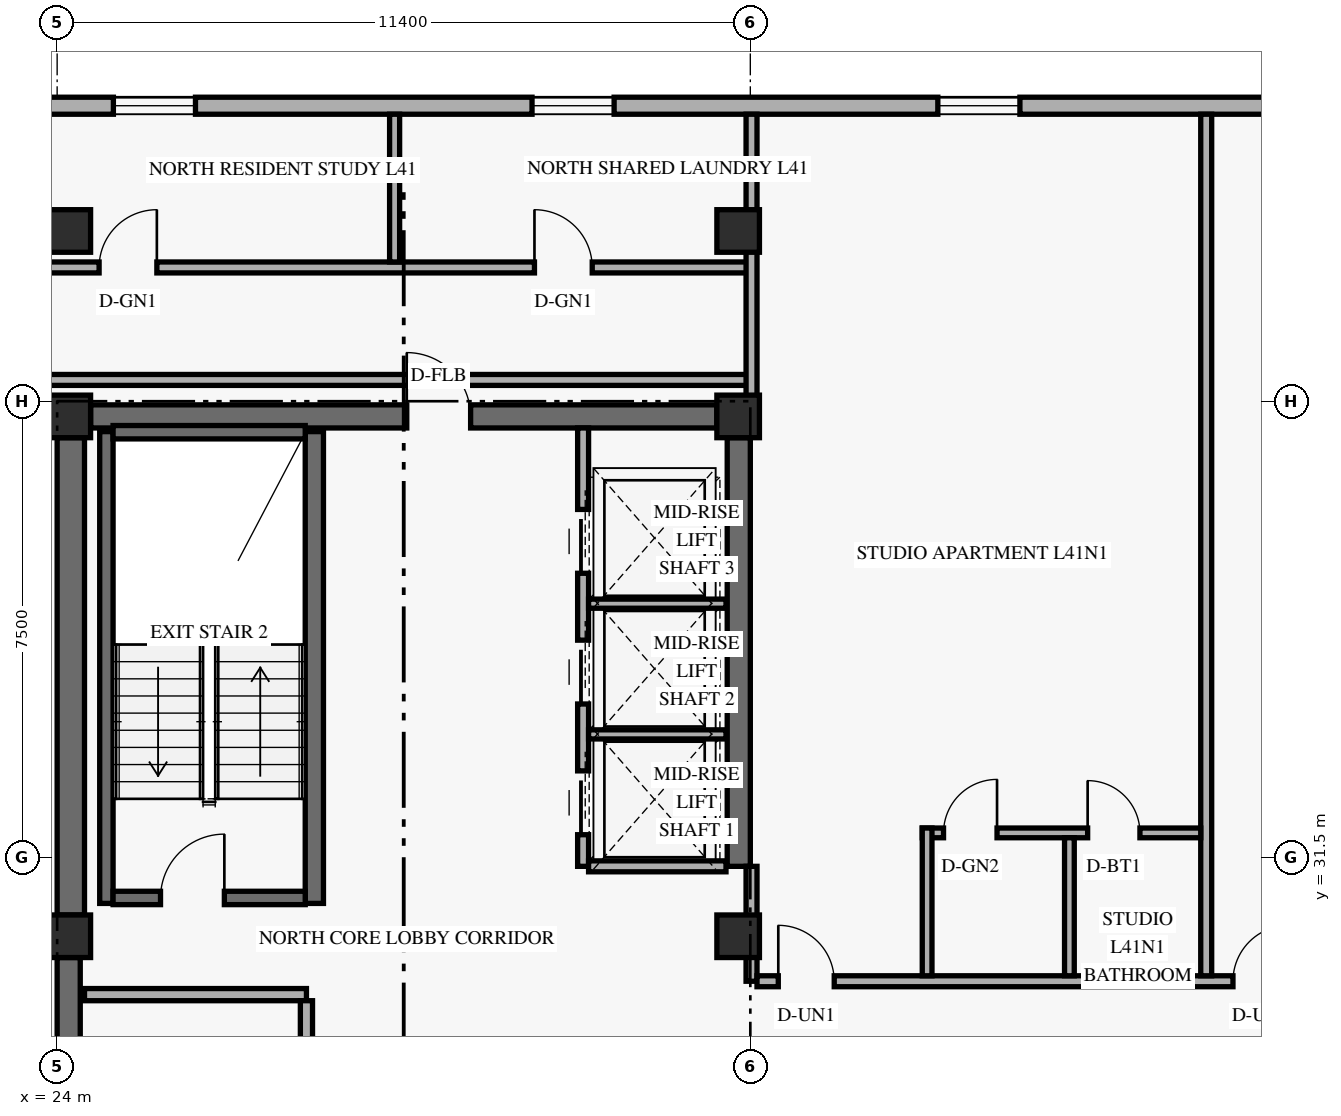
"""IFC4 building model, lengths in metres.
Left out: names, types, materials, properties, quantities, classifications, styles, units other than length and angle.
Written with IfcOpenShell. Run it as: python <this file> out.ifc"""

import sys

from ifc_helpers import new_model, si_unit, direction, frame, frame_2d, origin, origin_2d, place, context, subcontext, project, spatial, rectangle, extrude, element, fill, save


model = new_model("IFC4")
c1 = context("Model", 3, precision=1e-05, world=origin(), true_north=direction((0.0, 1.0)))
c2 = subcontext(c1, "Body", "Model", "MODEL_VIEW")
j1 = project(units=[si_unit("LENGTHUNIT", "METRE"), si_unit("PLANEANGLEUNIT", "RADIAN")], contexts=[c1])
p1 = place(None, origin())
s1 = spatial("IfcSite", under=j1, at=p1, CompositionType="ELEMENT")
p2 = place(p1, origin())
s2 = spatial("IfcBuilding", under=s1, at=p2, CompositionType="ELEMENT")
p3 = place(p2, frame((0.0, 0.0, 159.0)))
s3 = spatial("IfcBuildingStorey", under=s2, at=p3, CompositionType="ELEMENT", Elevation=159.0)
p4 = place(p3, frame((24.19, 17.9, 0.0), z_axis=(0.0, 0.0, 1.0), x_axis=(0.0, 1.0, 0.0)))
e1 = element("IfcWall", 1, at=p4, inside=s3, PredefinedType="SHEAR", context=c2, shape_type="SweptSolid", body=[
    extrude(rectangle(XDim=11.95, YDim=0.38, at=frame_2d((5.975, 0.0))), origin(), (0.0, 0.0, 1.0), 2.748),
])
p5 = place(p3, frame((24.225, 30.55, 0.0), z_axis=(0.0, 0.0, 1.0), x_axis=(0.0, 1.0, 0.0)))
e2 = element("IfcWall", 2, at=p5, inside=s3, PredefinedType="SHEAR", context=c2, shape_type="SweptSolid", body=[
    extrude(rectangle(XDim=7.85, YDim=0.45, at=frame_2d((3.925, 0.0))), origin(), (0.0, 0.0, 1.0), 2.748),
])
p6 = place(p3, frame((35.21, 31.35, 0.0), z_axis=(0.0, 0.0, 1.0), x_axis=(0.0, 1.0, 0.0)))
e3 = element("IfcWall", 3, at=p6, inside=s3, PredefinedType="SHEAR", context=c2, shape_type="SweptSolid", body=[
    extrude(rectangle(XDim=7.05, YDim=0.38, at=frame_2d((3.525, 0.0))), origin(), (0.0, 0.0, 1.0), 2.748),
])
p7 = place(p3, frame((24.55, 38.75, 0.0), z_axis=(0.0, 0.0, 1.0), x_axis=(1.0, 0.0, 0.0)))
e4 = element("IfcWall", 4, at=p7, inside=s3, PredefinedType="SHEAR", context=c2, shape_type="SweptSolid", body=[
    extrude(rectangle(XDim=10.3, YDim=0.38, at=frame_2d((5.15, 0.0))), origin(), (0.0, 0.0, 1.0), 3.36),
])
p8 = place(p7, frame((5.2, 0.0, 0.0)))
e5 = element("IfcOpeningElement", 5, at=p8, cuts=e4, PredefinedType="OPENING", context=c2, shape_type="SweptSolid", body=[
    extrude(rectangle(XDim=1.05, YDim=2.15, at=frame_2d((0.525, 1.075))), frame((0.0, 0.2, 0.0), z_axis=(0.0, -1.0, 0.0), x_axis=(1.0, 0.0, 0.0)), (0.0, 0.0, 1.0), 0.4),
])
p9 = place(p3, frame((24.81, 30.74, 0.0), z_axis=(0.0, 0.0, 1.0), x_axis=(0.0, 1.0, 0.0)))
e6 = element("IfcWall", 6, at=p9, inside=s3, PredefinedType="SHEAR", context=c2, shape_type="SweptSolid", body=[
    extrude(rectangle(XDim=7.76, YDim=0.22, at=frame_2d((3.88, 0.0))), origin(), (0.0, 0.0, 1.0), 3.36),
])
p10 = place(p3, frame((28.23, 30.74, 0.0), z_axis=(0.0, 0.0, 1.0), x_axis=(0.0, 1.0, 0.0)))
e7 = element("IfcWall", 7, at=p10, inside=s3, PredefinedType="SHEAR", context=c2, shape_type="SweptSolid", body=[
    extrude(rectangle(XDim=7.76, YDim=0.3, at=frame_2d((3.88, 0.0))), origin(), (0.0, 0.0, 1.0), 3.36),
])
p11 = place(p3, frame((24.92, 30.83, 0.0), z_axis=(0.0, 0.0, 1.0), x_axis=(1.0, 0.0, 0.0)))
e8 = element("IfcWall", 8, at=p11, inside=s3, PredefinedType="SHEAR", context=c2, shape_type="SweptSolid", body=[
    extrude(rectangle(XDim=3.16, YDim=0.22, at=frame_2d((1.58, 0.0))), origin(), (0.0, 0.0, 1.0), 3.36),
])
p12 = place(p11, frame((0.78, 0.0, 0.0)))
e9 = element("IfcOpeningElement", 9, at=p12, cuts=e8, PredefinedType="OPENING", context=c2, shape_type="SweptSolid", body=[
    extrude(rectangle(XDim=1.05, YDim=2.15, at=frame_2d((0.525, 1.075))), frame((0.0, 0.12, 0.0), z_axis=(0.0, -1.0, 0.0), x_axis=(1.0, 0.0, 0.0)), (0.0, 0.0, 1.0), 0.24),
])
p13 = place(p3, frame((24.92, 38.49, 0.0), z_axis=(0.0, 0.0, 1.0), x_axis=(1.0, 0.0, 0.0)))
e10 = element("IfcWall", 10, at=p13, inside=s3, PredefinedType="SHEAR", context=c2, shape_type="SweptSolid", body=[
    extrude(rectangle(XDim=3.16, YDim=0.22, at=frame_2d((1.58, 0.0))), origin(), (0.0, 0.0, 1.0), 3.36),
])
for number, where, z_axis, x_axis in (
    (11, (24.2, 30.2, 0.0), (0.0, 0.0, 1.0), (1.0, 0.0, 0.0)),
    (12, (24.2, 38.75, 0.0), (0.0, 0.0, 1.0), (1.0, 0.0, 0.0)),
    (13, (24.2, 41.8, 0.0), (0.0, 0.0, 1.0), (1.0, 0.0, 0.0)),
    (14, (35.2, 30.2, 0.0), (0.0, 0.0, 1.0), (1.0, 0.0, 0.0)),
    (15, (35.2, 38.75, 0.0), (0.0, 0.0, 1.0), (1.0, 0.0, 0.0)),
    (16, (35.2, 41.8, 0.0), (0.0, 0.0, 1.0), (1.0, 0.0, 0.0)),
):
    element("IfcColumn", number, at=place(p3, frame(where, z_axis=z_axis, x_axis=x_axis)), inside=s3, PredefinedType="COLUMN", context=c2, shape_type="SweptSolid", body=[
        extrude(rectangle(XDim=0.7, YDim=0.7, at=origin_2d()), origin(), (0.0, 0.0, 1.0), 3.6),
    ])
p14 = place(p3, frame((54.98, 43.86, 0.0), z_axis=(0.0, 0.0, 1.0), x_axis=(-1.0, 0.0, 0.0)))
e17 = element("IfcWall", 17, at=p14, inside=s3, PredefinedType="SOLIDWALL", context=c2, shape_type="SweptSolid", body=[
    extrude(rectangle(XDim=33.76, YDim=0.28, at=frame_2d((16.88, 0.0))), origin(), (0.0, 0.0, 1.0), 3.36),
])
p15 = place(p14, frame((28.705, 0.0, 0.85)))
e18 = element("IfcOpeningElement", 18, at=p15, cuts=e17, PredefinedType="OPENING", context=c2, shape_type="SweptSolid", body=[
    extrude(rectangle(XDim=1.35, YDim=1.55, at=frame_2d((0.675, 0.775))), frame((0.0, 0.15, 0.0), z_axis=(0.0, -1.0, 0.0), x_axis=(1.0, 0.0, 0.0)), (0.0, 0.0, 1.0), 0.3),
])
p16 = place(p14, frame((21.82, 0.0, 0.85)))
e19 = element("IfcOpeningElement", 19, at=p16, cuts=e17, PredefinedType="OPENING", context=c2, shape_type="SweptSolid", body=[
    extrude(rectangle(XDim=1.35, YDim=1.55, at=frame_2d((0.675, 0.775))), frame((0.0, 0.15, 0.0), z_axis=(0.0, -1.0, 0.0), x_axis=(1.0, 0.0, 0.0)), (0.0, 0.0, 1.0), 0.3),
])
p17 = place(p14, frame((15.146, 0.0, 0.85)))
e20 = element("IfcOpeningElement", 20, at=p17, cuts=e17, PredefinedType="OPENING", context=c2, shape_type="SweptSolid", body=[
    extrude(rectangle(XDim=1.35, YDim=1.55, at=frame_2d((0.675, 0.775))), frame((0.0, 0.15, 0.0), z_axis=(0.0, -1.0, 0.0), x_axis=(1.0, 0.0, 0.0)), (0.0, 0.0, 1.0), 0.3),
])
p18 = place(p14, frame((7.956, 0.0, 0.85)))
e21 = element("IfcOpeningElement", 21, at=p18, cuts=e17, PredefinedType="OPENING", context=c2, shape_type="SweptSolid", body=[
    extrude(rectangle(XDim=1.35, YDim=1.55, at=frame_2d((0.675, 0.775))), frame((0.0, 0.15, 0.0), z_axis=(0.0, -1.0, 0.0), x_axis=(1.0, 0.0, 0.0)), (0.0, 0.0, 1.0), 0.3),
])
p19 = place(p14, frame((1.915, 0.0, 0.85)))
e22 = element("IfcOpeningElement", 22, at=p19, cuts=e17, PredefinedType="OPENING", context=c2, shape_type="SweptSolid", body=[
    extrude(rectangle(XDim=1.35, YDim=1.55, at=frame_2d((0.675, 0.775))), frame((0.0, 0.15, 0.0), z_axis=(0.0, -1.0, 0.0), x_axis=(1.0, 0.0, 0.0)), (0.0, 0.0, 1.0), 0.3),
])
p20 = place(p3, frame((24.45, 29.24, 0.0), z_axis=(0.0, 0.0, 1.0), x_axis=(1.0, 0.0, 0.0)))
e23 = element("IfcWall", 23, at=p20, inside=s3, PredefinedType="STANDARD", context=c2, shape_type="SweptSolid", body=[
    extrude(rectangle(XDim=3.65, YDim=0.2, at=frame_2d((1.825, 0.0))), origin(), (0.0, 0.0, 1.0), 3.36),
])
p21 = place(p3, frame((28.1, 24.39, 0.0), z_axis=(0.0, 0.0, 1.0), x_axis=(0.0, 1.0, 0.0)))
e24 = element("IfcWall", 24, at=p21, inside=s3, PredefinedType="STANDARD", context=c2, shape_type="SweptSolid", body=[
    extrude(rectangle(XDim=4.75, YDim=0.2, at=frame_2d((2.375, 0.0))), origin(), (0.0, 0.0, 1.0), 3.36),
])
p22 = place(p21, frame((0.63, 0.0, 0.0)))
e25 = element("IfcOpeningElement", 25, at=p22, cuts=e24, PredefinedType="OPENING", context=c2, shape_type="SweptSolid", body=[
    extrude(rectangle(XDim=0.9, YDim=2.1, at=frame_2d((0.45, 1.05))), frame((0.0, 0.11, 0.0), z_axis=(0.0, -1.0, 0.0), x_axis=(1.0, 0.0, 0.0)), (0.0, 0.0, 1.0), 0.22),
])
p23 = place(p21, frame((3.06, 0.0, 0.0)))
e26 = element("IfcOpeningElement", 26, at=p23, cuts=e24, PredefinedType="OPENING", context=c2, shape_type="SweptSolid", body=[
    extrude(rectangle(XDim=0.9, YDim=2.1, at=frame_2d((0.45, 1.05))), frame((0.0, 0.11, 0.0), z_axis=(0.0, -1.0, 0.0), x_axis=(1.0, 0.0, 0.0)), (0.0, 0.0, 1.0), 0.22),
])
p24 = place(p3, frame((32.65, 31.35, 0.0), z_axis=(0.0, 0.0, 1.0), x_axis=(0.0, 1.0, 0.0)))
e27 = element("IfcWall", 27, at=p24, inside=s3, PredefinedType="STANDARD", context=c2, shape_type="SweptSolid", body=[
    extrude(rectangle(XDim=7.21, YDim=0.18, at=frame_2d((3.605, 0.0))), origin(), (0.0, 0.0, 1.0), 3.36),
])
p25 = place(p24, frame((0.52, 0.0, 0.0)))
e28 = element("IfcOpeningElement", 28, at=p25, cuts=e27, PredefinedType="OPENING", context=c2, shape_type="SweptSolid", body=[
    extrude(rectangle(XDim=1.05, YDim=2.2, at=frame_2d((0.525, 1.1))), frame((0.0, 0.1, 0.0), z_axis=(0.0, -1.0, 0.0), x_axis=(1.0, 0.0, 0.0)), (0.0, 0.0, 1.0), 0.2),
])
p26 = place(p24, frame((2.67, 0.0, 0.0)))
e29 = element("IfcOpeningElement", 29, at=p26, cuts=e27, PredefinedType="OPENING", context=c2, shape_type="SweptSolid", body=[
    extrude(rectangle(XDim=1.05, YDim=2.2, at=frame_2d((0.525, 1.1))), frame((0.0, 0.1, 0.0), z_axis=(0.0, -1.0, 0.0), x_axis=(1.0, 0.0, 0.0)), (0.0, 0.0, 1.0), 0.2),
])
p27 = place(p24, frame((4.82, 0.0, 0.0)))
e30 = element("IfcOpeningElement", 30, at=p27, cuts=e27, PredefinedType="OPENING", context=c2, shape_type="SweptSolid", body=[
    extrude(rectangle(XDim=1.05, YDim=2.2, at=frame_2d((0.525, 1.1))), frame((0.0, 0.1, 0.0), z_axis=(0.0, -1.0, 0.0), x_axis=(1.0, 0.0, 0.0)), (0.0, 0.0, 1.0), 0.2),
])
p28 = place(p3, frame((32.74, 31.35, 0.0), z_axis=(0.0, 0.0, 1.0), x_axis=(1.0, 0.0, 0.0)))
e31 = element("IfcWall", 31, at=p28, inside=s3, PredefinedType="STANDARD", context=c2, shape_type="SweptSolid", body=[
    extrude(rectangle(XDim=2.26, YDim=0.18, at=frame_2d((1.13, 0.0))), origin(), (0.0, 0.0, 1.0), 3.36),
])
for number, where, z_axis, x_axis in (
    (32, (32.74, 33.52, 0.0), (0.0, 0.0, 1.0), (1.0, 0.0, 0.0)),
    (33, (32.74, 35.67, 0.0), (0.0, 0.0, 1.0), (1.0, 0.0, 0.0)),
):
    element("IfcWall", number, at=place(p3, frame(where, z_axis=z_axis, x_axis=x_axis)), inside=s3, PredefinedType="STANDARD", context=c2, shape_type="SweptSolid", body=[
        extrude(rectangle(XDim=2.26, YDim=0.15, at=frame_2d((1.13, 0.0))), origin(), (0.0, 0.0, 1.0), 3.36),
    ])
p29 = place(p3, frame((35.42, 29.46, 0.0), z_axis=(0.0, 0.0, 1.0), x_axis=(0.0, 1.0, 0.0)))
e34 = element("IfcWall", 34, at=p29, inside=s3, PredefinedType="STANDARD", context=c2, shape_type="SweptSolid", body=[
    extrude(rectangle(XDim=1.89, YDim=0.18, at=frame_2d((0.945, 0.0))), origin(), (0.0, 0.0, 1.0), 2.73),
])
p30 = place(p3, frame((35.51, 29.46, 0.0), z_axis=(0.0, 0.0, 1.0), x_axis=(1.0, 0.0, 0.0)))
e35 = element("IfcWall", 35, at=p30, inside=s3, PredefinedType="STANDARD", context=c2, shape_type="SweptSolid", body=[
    extrude(rectangle(XDim=14.29, YDim=0.18, at=frame_2d((7.145, 0.0))), origin(), (0.0, 0.0, 1.0), 2.73),
])
p31 = place(p30, frame((0.35, 0.0, 0.0)))
e36 = element("IfcOpeningElement", 36, at=p31, cuts=e35, PredefinedType="OPENING", context=c2, shape_type="SweptSolid", body=[
    extrude(rectangle(XDim=0.92, YDim=2.15, at=frame_2d((0.46, 1.075))), frame((0.0, 0.1, 0.0), z_axis=(0.0, -1.0, 0.0), x_axis=(1.0, 0.0, 0.0)), (0.0, 0.0, 1.0), 0.2),
])
p32 = place(p30, frame((7.828, 0.0, 0.0)))
e37 = element("IfcOpeningElement", 37, at=p32, cuts=e35, PredefinedType="OPENING", context=c2, shape_type="SweptSolid", body=[
    extrude(rectangle(XDim=0.92, YDim=2.15, at=frame_2d((0.46, 1.075))), frame((0.0, 0.1, 0.0), z_axis=(0.0, -1.0, 0.0), x_axis=(1.0, 0.0, 0.0)), (0.0, 0.0, 1.0), 0.2),
])
p33 = place(p3, frame((21.74, 41.2, 0.0), z_axis=(0.0, 0.0, 1.0), x_axis=(1.0, 0.0, 0.0)))
e38 = element("IfcWall", 38, at=p33, inside=s3, PredefinedType="STANDARD", context=c2, shape_type="SweptSolid", body=[
    extrude(rectangle(XDim=13.68, YDim=0.18, at=frame_2d((6.84, 0.0))), origin(), (0.0, 0.0, 1.0), 2.73),
])
p34 = place(p33, frame((2.95, 0.0, 0.0)))
e39 = element("IfcOpeningElement", 39, at=p34, cuts=e38, PredefinedType="OPENING", context=c2, shape_type="SweptSolid", body=[
    extrude(rectangle(XDim=0.95, YDim=2.15, at=frame_2d((0.475, 1.075))), frame((0.0, 0.1, 0.0), z_axis=(0.0, -1.0, 0.0), x_axis=(1.0, 0.0, 0.0)), (0.0, 0.0, 1.0), 0.2),
])
p35 = place(p33, frame((10.11, 0.0, 0.0)))
e40 = element("IfcOpeningElement", 40, at=p35, cuts=e38, PredefinedType="OPENING", context=c2, shape_type="SweptSolid", body=[
    extrude(rectangle(XDim=0.95, YDim=2.15, at=frame_2d((0.475, 1.075))), frame((0.0, 0.1, 0.0), z_axis=(0.0, -1.0, 0.0), x_axis=(1.0, 0.0, 0.0)), (0.0, 0.0, 1.0), 0.2),
])
p36 = place(p3, frame((23.85, 39.35, 0.0), z_axis=(0.0, 0.0, 1.0), x_axis=(1.0, 0.0, 0.0)))
e41 = element("IfcWall", 41, at=p36, inside=s3, PredefinedType="STANDARD", context=c2, shape_type="SweptSolid", body=[
    extrude(rectangle(XDim=11.57, YDim=0.18, at=frame_2d((5.785, 0.0))), origin(), (0.0, 0.0, 1.0), 2.73),
])
p37 = place(p3, frame((35.42, 38.75, 0.0), z_axis=(0.0, 0.0, 1.0), x_axis=(0.0, 1.0, 0.0)))
e42 = element("IfcWall", 42, at=p37, inside=s3, PredefinedType="PARTITIONING", context=c2, shape_type="SweptSolid", body=[
    extrude(rectangle(XDim=4.97, YDim=0.18, at=frame_2d((2.485, 0.0))), origin(), (0.0, 0.0, 1.0), 2.73),
])
p38 = place(p3, frame((42.898, 29.55, 0.0), z_axis=(0.0, 0.0, 1.0), x_axis=(0.0, 1.0, 0.0)))
e43 = element("IfcWall", 43, at=p38, inside=s3, PredefinedType="PARTITIONING", context=c2, shape_type="SweptSolid", body=[
    extrude(rectangle(XDim=14.17, YDim=0.18, at=frame_2d((7.085, 0.0))), origin(), (0.0, 0.0, 1.0), 2.73),
])
p39 = place(p3, frame((38.228, 31.9, 0.0), z_axis=(0.0, 0.0, 1.0), x_axis=(1.0, 0.0, 0.0)))
e44 = element("IfcWall", 44, at=p39, inside=s3, PredefinedType="PLUMBINGWALL", context=c2, shape_type="SweptSolid", body=[
    extrude(rectangle(XDim=4.58, YDim=0.16, at=frame_2d((2.29, 0.0))), origin(), (0.0, 0.0, 1.0), 3.36),
])
p40 = place(p39, frame((0.35, 0.0, 0.0)))
e45 = element("IfcOpeningElement", 45, at=p40, cuts=e44, PredefinedType="OPENING", context=c2, shape_type="SweptSolid", body=[
    extrude(rectangle(XDim=0.88, YDim=2.12, at=frame_2d((0.44, 1.06))), frame((0.0, 0.09, 0.0), z_axis=(0.0, -1.0, 0.0), x_axis=(1.0, 0.0, 0.0)), (0.0, 0.0, 1.0), 0.18),
])
p41 = place(p39, frame((2.72, 0.0, 0.0)))
e46 = element("IfcOpeningElement", 46, at=p41, cuts=e44, PredefinedType="OPENING", context=c2, shape_type="SweptSolid", body=[
    extrude(rectangle(XDim=0.86, YDim=2.12, at=frame_2d((0.43, 1.06))), frame((0.0, 0.09, 0.0), z_axis=(0.0, -1.0, 0.0), x_axis=(1.0, 0.0, 0.0)), (0.0, 0.0, 1.0), 0.18),
])
p42 = place(p3, frame((38.308, 29.55, 0.0), z_axis=(0.0, 0.0, 1.0), x_axis=(0.0, 1.0, 0.0)))
e47 = element("IfcWall", 47, at=p42, inside=s3, PredefinedType="PLUMBINGWALL", context=c2, shape_type="SweptSolid", body=[
    extrude(rectangle(XDim=2.43, YDim=0.16, at=frame_2d((1.215, 0.0))), origin(), (0.0, 0.0, 1.0), 2.73),
])
p43 = place(p3, frame((40.648, 29.55, 0.0), z_axis=(0.0, 0.0, 1.0), x_axis=(0.0, 1.0, 0.0)))
e48 = element("IfcWall", 48, at=p43, inside=s3, PredefinedType="PLUMBINGWALL", context=c2, shape_type="SweptSolid", body=[
    extrude(rectangle(XDim=2.27, YDim=0.16, at=frame_2d((1.135, 0.0))), origin(), (0.0, 0.0, 1.0), 2.73),
])
p44 = place(p3, frame((29.55, 41.29, 0.0), z_axis=(0.0, 0.0, 1.0), x_axis=(0.0, 1.0, 0.0)))
e49 = element("IfcWall", 49, at=p44, inside=s3, PredefinedType="PARTITIONING", context=c2, shape_type="SweptSolid", body=[
    extrude(rectangle(XDim=2.43, YDim=0.165, at=frame_2d((1.215, 0.0))), origin(), (0.0, 0.0, 1.0), 2.879),
])
p45 = place(p15, origin())
e50 = element("IfcWindow", 50, at=p45, inside=s3, PartitioningType="SINGLE_PANEL", PredefinedType="WINDOW", context=c2, shape_type="SweptSolid", body=[
    extrude(rectangle(XDim=1.35, YDim=1.55, at=frame_2d((0.675, 0.775))), frame((0.0, 0.03, 0.0), z_axis=(0.0, -1.0, 0.0), x_axis=(1.0, 0.0, 0.0)), (0.0, 0.0, 1.0), 0.06),
])
fill(e18, e50)
p46 = place(p16, origin())
e51 = element("IfcWindow", 51, at=p46, inside=s3, PartitioningType="SINGLE_PANEL", PredefinedType="WINDOW", context=c2, shape_type="SweptSolid", body=[
    extrude(rectangle(XDim=1.35, YDim=1.55, at=frame_2d((0.675, 0.775))), frame((0.0, 0.03, 0.0), z_axis=(0.0, -1.0, 0.0), x_axis=(1.0, 0.0, 0.0)), (0.0, 0.0, 1.0), 0.06),
])
fill(e19, e51)
p47 = place(p17, origin())
e52 = element("IfcWindow", 52, at=p47, inside=s3, PartitioningType="SINGLE_PANEL", PredefinedType="WINDOW", context=c2, shape_type="SweptSolid", body=[
    extrude(rectangle(XDim=1.35, YDim=1.55, at=frame_2d((0.675, 0.775))), frame((0.0, 0.03, 0.0), z_axis=(0.0, -1.0, 0.0), x_axis=(1.0, 0.0, 0.0)), (0.0, 0.0, 1.0), 0.06),
])
fill(e20, e52)
p48 = place(p12, origin())
e53 = element("IfcDoor", 53, at=p48, inside=s3, OperationType="SINGLE_SWING_RIGHT", PredefinedType="DOOR", context=c2, shape_type="SweptSolid", body=[
    extrude(rectangle(XDim=1.05, YDim=2.15, at=frame_2d((0.525, 1.075))), frame((0.0, 0.025, 0.0), z_axis=(0.0, -1.0, 0.0), x_axis=(1.0, 0.0, 0.0)), (0.0, 0.0, 1.0), 0.05),
])
fill(e9, e53)
p49 = place(p25, origin())
e54 = element("IfcDoor", 54, at=p49, inside=s3, OperationType="SLIDING_TO_LEFT", PredefinedType="DOOR", context=c2, shape_type="SweptSolid", body=[
    extrude(rectangle(XDim=1.05, YDim=2.2, at=frame_2d((0.525, 1.1))), frame((0.0, 0.025, 0.0), z_axis=(0.0, -1.0, 0.0), x_axis=(1.0, 0.0, 0.0)), (0.0, 0.0, 1.0), 0.05),
])
fill(e28, e54)
p50 = place(p26, origin())
e55 = element("IfcDoor", 55, at=p50, inside=s3, OperationType="SLIDING_TO_LEFT", PredefinedType="DOOR", context=c2, shape_type="SweptSolid", body=[
    extrude(rectangle(XDim=1.05, YDim=2.2, at=frame_2d((0.525, 1.1))), frame((0.0, 0.025, 0.0), z_axis=(0.0, -1.0, 0.0), x_axis=(1.0, 0.0, 0.0)), (0.0, 0.0, 1.0), 0.05),
])
fill(e29, e55)
p51 = place(p27, origin())
e56 = element("IfcDoor", 56, at=p51, inside=s3, OperationType="SLIDING_TO_LEFT", PredefinedType="DOOR", context=c2, shape_type="SweptSolid", body=[
    extrude(rectangle(XDim=1.05, YDim=2.2, at=frame_2d((0.525, 1.1))), frame((0.0, 0.025, 0.0), z_axis=(0.0, -1.0, 0.0), x_axis=(1.0, 0.0, 0.0)), (0.0, 0.0, 1.0), 0.05),
])
fill(e30, e56)
p52 = place(p8, frame((1.05, 0.0, 0.0), z_axis=(0.0, 0.0, 1.0), x_axis=(-1.0, 0.0, 0.0)))
e57 = element("IfcDoor", 57, at=p52, inside=s3, OperationType="SINGLE_SWING_RIGHT", PredefinedType="DOOR", context=c2, shape_type="SweptSolid", body=[
    extrude(rectangle(XDim=1.05, YDim=2.15, at=frame_2d((0.525, 1.075))), frame((0.0, 0.025, 0.0), z_axis=(0.0, -1.0, 0.0), x_axis=(1.0, 0.0, 0.0)), (0.0, 0.0, 1.0), 0.05),
])
fill(e5, e57)
p53 = place(p31, origin())
e58 = element("IfcDoor", 58, at=p53, inside=s3, OperationType="SINGLE_SWING_LEFT", PredefinedType="DOOR", context=c2, shape_type="SweptSolid", body=[
    extrude(rectangle(XDim=0.92, YDim=2.15, at=frame_2d((0.46, 1.075))), frame((0.0, 0.025, 0.0), z_axis=(0.0, -1.0, 0.0), x_axis=(1.0, 0.0, 0.0)), (0.0, 0.0, 1.0), 0.05),
])
fill(e36, e58)
p54 = place(p40, origin())
e59 = element("IfcDoor", 59, at=p54, inside=s3, OperationType="SINGLE_SWING_RIGHT", PredefinedType="DOOR", context=c2, shape_type="SweptSolid", body=[
    extrude(rectangle(XDim=0.88, YDim=2.12, at=frame_2d((0.44, 1.06))), frame((0.0, 0.025, 0.0), z_axis=(0.0, -1.0, 0.0), x_axis=(1.0, 0.0, 0.0)), (0.0, 0.0, 1.0), 0.05),
])
fill(e45, e59)
p55 = place(p41, origin())
e60 = element("IfcDoor", 60, at=p55, inside=s3, OperationType="SINGLE_SWING_LEFT", PredefinedType="DOOR", context=c2, shape_type="SweptSolid", body=[
    extrude(rectangle(XDim=0.86, YDim=2.12, at=frame_2d((0.43, 1.06))), frame((0.0, 0.025, 0.0), z_axis=(0.0, -1.0, 0.0), x_axis=(1.0, 0.0, 0.0)), (0.0, 0.0, 1.0), 0.05),
])
fill(e46, e60)
p56 = place(p32, origin())
e61 = element("IfcDoor", 61, at=p56, inside=s3, OperationType="SINGLE_SWING_RIGHT", PredefinedType="DOOR", context=c2, shape_type="SweptSolid", body=[
    extrude(rectangle(XDim=0.92, YDim=2.15, at=frame_2d((0.46, 1.075))), frame((0.0, 0.025, 0.0), z_axis=(0.0, -1.0, 0.0), x_axis=(1.0, 0.0, 0.0)), (0.0, 0.0, 1.0), 0.05),
])
fill(e37, e61)
p57 = place(p34, origin())
e62 = element("IfcDoor", 62, at=p57, inside=s3, OperationType="SINGLE_SWING_RIGHT", PredefinedType="DOOR", context=c2, shape_type="SweptSolid", body=[
    extrude(rectangle(XDim=0.95, YDim=2.15, at=frame_2d((0.475, 1.075))), frame((0.0, 0.025, 0.0), z_axis=(0.0, -1.0, 0.0), x_axis=(1.0, 0.0, 0.0)), (0.0, 0.0, 1.0), 0.05),
])
fill(e39, e62)
p58 = place(p35, origin())
e63 = element("IfcDoor", 63, at=p58, inside=s3, OperationType="SINGLE_SWING_LEFT", PredefinedType="DOOR", context=c2, shape_type="SweptSolid", body=[
    extrude(rectangle(XDim=0.95, YDim=2.15, at=frame_2d((0.475, 1.075))), frame((0.0, 0.025, 0.0), z_axis=(0.0, -1.0, 0.0), x_axis=(1.0, 0.0, 0.0)), (0.0, 0.0, 1.0), 0.05),
])
fill(e40, e63)
save(model, sys.argv[1])
